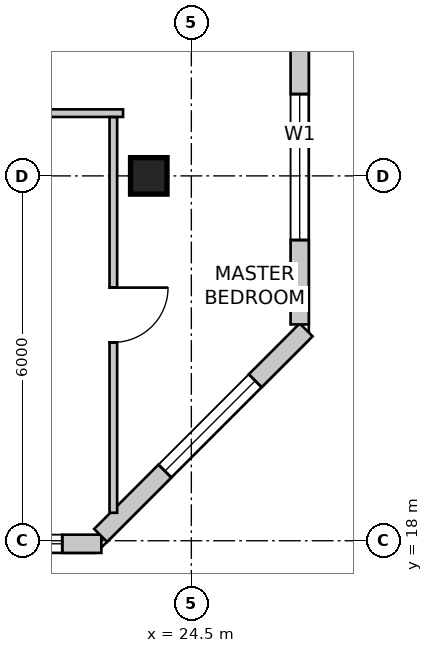
"""IFC4 building model, lengths in metres.
Left out: names, types, materials, properties, quantities, classifications, styles, units other than length and angle.
Written with IfcOpenShell. Run it as: python <this file> out.ifc"""

import sys

from ifc_helpers import new_model, si_unit, direction, frame, frame_2d, origin, origin_2d, place, context, subcontext, project, spatial, rectangle, extrude, source, transform, mapped, element, fill, save


model = new_model("IFC4")
c1 = context("Model", 3, precision=1e-05, world=origin(), true_north=direction((0.0, 1.0)))
c2 = subcontext(c1, "Body", "Model", "MODEL_VIEW")
j1 = project(units=[si_unit("LENGTHUNIT", "METRE"), si_unit("PLANEANGLEUNIT", "RADIAN")], contexts=[c1])
p1 = place(None, origin())
s1 = spatial("IfcSite", under=j1, at=p1, CompositionType="ELEMENT")
p2 = place(p1, origin())
s2 = spatial("IfcBuilding", under=s1, at=p2, CompositionType="ELEMENT")
p3 = place(p2, frame((0.0, 0.0, 252.9)))
s3 = spatial("IfcBuildingStorey", under=s2, at=p3, CompositionType="ELEMENT", Elevation=252.9)
m1 = source(origin(), c2, "Body", "SweptSolid", [
    extrude(rectangle(XDim=0.6, YDim=0.6, at=origin_2d()), origin(), (0.0, 0.0, 1.0), 3.6),
])
p4 = place(p3, frame((23.8, 24.0, 0.0), z_axis=(0.0, 0.0, 1.0), x_axis=(1.0, 0.0, 0.0)))
e1 = element("IfcColumn", 1, at=p4, inside=s3, PredefinedType="COLUMN", context=c2, shape_type="MappedRepresentation", body=[
    mapped(m1, transform((0.0, 0.0, 0.0), scale=1.0)),
])
p5 = place(p3, frame((12.678, 17.95, 0.0), z_axis=(0.0, 0.0, 1.0), x_axis=(1.0, 0.0, 0.0)))
e2 = element("IfcWall", 2, at=p5, inside=s3, PredefinedType="SOLIDWALL", context=c2, shape_type="SweptSolid", body=[
    extrude(rectangle(XDim=10.342, YDim=0.3, at=frame_2d((5.171, 0.0))), origin(), (0.0, 0.0, 1.0), 3.35),
])
m2 = source(origin(), c2, "Body", "SweptSolid", [
    extrude(rectangle(XDim=1.6, YDim=2.15, at=frame_2d((0.8, 1.075))), frame((0.0, 0.16, 0.0), z_axis=(0.0, -1.0, 0.0), x_axis=(1.0, 0.0, 0.0)), (0.0, 0.0, 1.0), 0.32),
])
p6 = place(p5, frame((4.204, 0.0, 0.0)))
e3 = element("IfcOpeningElement", 3, at=p6, cuts=e2, PredefinedType="OPENING", context=c2, shape_type="MappedRepresentation", body=[
    mapped(m2, transform((0.0, 0.0, 0.0), scale=1.0)),
])
m3 = source(origin(), c2, "Body", "SweptSolid", [
    extrude(rectangle(XDim=2.1, YDim=2.0, at=frame_2d((1.05, 1.0))), frame((0.0, 0.16, 0.0), z_axis=(0.0, -1.0, 0.0), x_axis=(1.0, 0.0, 0.0)), (0.0, 0.0, 1.0), 0.32),
])
p7 = place(p5, frame((0.547, 0.0, 0.85)))
e4 = element("IfcOpeningElement", 4, at=p7, cuts=e2, PredefinedType="OPENING", context=c2, shape_type="MappedRepresentation", body=[
    mapped(m3, transform((0.0, 0.0, 0.0), scale=1.0)),
])
m4 = source(origin(), c2, "Body", "SweptSolid", [
    extrude(rectangle(XDim=2.4, YDim=2.2, at=frame_2d((1.2, 1.1))), frame((0.0, 0.16, 0.0), z_axis=(0.0, -1.0, 0.0), x_axis=(1.0, 0.0, 0.0)), (0.0, 0.0, 1.0), 0.32),
])
p8 = place(p5, frame((7.299, 0.0, 0.85)))
e5 = element("IfcOpeningElement", 5, at=p8, cuts=e2, PredefinedType="OPENING", context=c2, shape_type="MappedRepresentation", body=[
    mapped(m4, transform((0.0, 0.0, 0.0), scale=1.0)),
])
p9 = place(p3, frame((23.008, 18.088, 0.0), z_axis=(0.0, 0.0, 1.0), x_axis=(0.707106781187, 0.707106781187, 0.0)))
e6 = element("IfcWall", 6, at=p9, inside=s3, PredefinedType="SOLIDWALL", context=c2, shape_type="SweptSolid", body=[
    extrude(rectangle(XDim=4.781, YDim=0.3, at=frame_2d((2.39, 0.0))), origin(), (0.0, 0.0, 1.0), 3.35),
])
p10 = place(p9, frame((1.496, 0.0, 0.85)))
e7 = element("IfcOpeningElement", 7, at=p10, cuts=e6, PredefinedType="OPENING", context=c2, shape_type="MappedRepresentation", body=[
    mapped(m3, transform((0.0, 0.0, 0.0), scale=1.0)),
])
p11 = place(p3, frame((26.282, 21.557, 0.0), z_axis=(0.0, 0.0, 1.0), x_axis=(0.0, 1.0, 0.0)))
e8 = element("IfcWall", 8, at=p11, inside=s3, PredefinedType="SOLIDWALL", context=c2, shape_type="SweptSolid", body=[
    extrude(rectangle(XDim=9.711, YDim=0.3, at=frame_2d((4.855, 0.0))), origin(), (0.0, 0.0, 1.0), 3.35),
])
p12 = place(p11, frame((1.388, 0.0, 0.85)))
e9 = element("IfcOpeningElement", 9, at=p12, cuts=e8, PredefinedType="OPENING", context=c2, shape_type="MappedRepresentation", body=[
    mapped(m4, transform((0.0, 0.0, 0.0), scale=1.0)),
])
p13 = place(p11, frame((6.073, 0.0, 0.85)))
e10 = element("IfcOpeningElement", 10, at=p13, cuts=e8, PredefinedType="OPENING", context=c2, shape_type="MappedRepresentation", body=[
    mapped(m3, transform((0.0, 0.0, 0.0), scale=1.0)),
])
p14 = place(p3, frame((23.377, 25.032, 0.0), z_axis=(0.0, 0.0, 1.0), x_axis=(-1.0, 0.0, 0.0)))
e11 = element("IfcWall", 11, at=p14, inside=s3, PredefinedType="PARTITIONING", context=c2, shape_type="SweptSolid", body=[
    extrude(rectangle(XDim=3.252, YDim=0.125, at=frame_2d((1.626, 0.0))), origin(), (0.0, 0.0, 1.0), 3.019),
])
p15 = place(p3, frame((23.217, 24.966, 0.0), z_axis=(0.0, 0.0, 1.0), x_axis=(0.0, -1.0, 0.0)))
e12 = element("IfcWall", 12, at=p15, inside=s3, PredefinedType="PARTITIONING", context=c2, shape_type="SweptSolid", body=[
    extrude(rectangle(XDim=6.506, YDim=0.125, at=frame_2d((3.253, 0.0))), origin(), (0.0, 0.0, 1.0), 2.979),
])
m5 = source(origin(), c2, "Body", "SweptSolid", [
    extrude(rectangle(XDim=0.9, YDim=2.15, at=frame_2d((0.45, 1.075))), frame((0.0, 0.073, 0.0), z_axis=(0.0, -1.0, 0.0), x_axis=(1.0, 0.0, 0.0)), (0.0, 0.0, 1.0), 0.145),
])
p16 = place(p15, frame((2.803, 0.0, 0.0)))
e13 = element("IfcOpeningElement", 13, at=p16, cuts=e12, PredefinedType="OPENING", context=c2, shape_type="MappedRepresentation", body=[
    mapped(m5, transform((0.0, 0.0, 0.0), scale=1.0)),
])
m6 = source(origin(), c2, "Body", "SweptSolid", [
    extrude(rectangle(XDim=2.4, YDim=2.2, at=frame_2d((1.2, 1.1))), frame((0.0, -0.015, 0.0), z_axis=(0.0, -1.0, 0.0), x_axis=(1.0, 0.0, 0.0)), (0.0, 0.0, 1.0), 0.06),
])
p17 = place(p8, origin())
e14 = element("IfcWindow", 14, at=p17, inside=s3, PartitioningType="SINGLE_PANEL", PredefinedType="WINDOW", context=c2, shape_type="MappedRepresentation", body=[
    mapped(m6, transform((0.0, 0.0, 0.0), scale=1.0)),
])
fill(e5, e14)
m7 = source(origin(), c2, "Body", "SweptSolid", [
    extrude(rectangle(XDim=2.1, YDim=2.0, at=frame_2d((1.05, 1.0))), frame((0.0, -0.015, 0.0), z_axis=(0.0, -1.0, 0.0), x_axis=(1.0, 0.0, 0.0)), (0.0, 0.0, 1.0), 0.06),
])
p18 = place(p10, origin())
e15 = element("IfcWindow", 15, at=p18, inside=s3, PartitioningType="SINGLE_PANEL", PredefinedType="WINDOW", context=c2, shape_type="MappedRepresentation", body=[
    mapped(m7, transform((0.0, 0.0, 0.0), scale=1.0)),
])
fill(e7, e15)
p19 = place(p12, origin())
e16 = element("IfcWindow", 16, at=p19, inside=s3, PartitioningType="SINGLE_PANEL", PredefinedType="WINDOW", context=c2, shape_type="MappedRepresentation", body=[
    mapped(m6, transform((0.0, 0.0, 0.0), scale=1.0)),
])
fill(e9, e16)
m8 = source(origin(), c2, "Body", "SweptSolid", [
    extrude(rectangle(XDim=0.9, YDim=2.15, at=frame_2d((0.45, 1.075))), frame((0.0, 0.025, 0.0), z_axis=(0.0, -1.0, 0.0), x_axis=(1.0, 0.0, 0.0)), (0.0, 0.0, 1.0), 0.05),
])
p20 = place(p16, origin())
e17 = element("IfcDoor", 17, at=p20, inside=s3, OperationType="SINGLE_SWING_LEFT", PredefinedType="DOOR", context=c2, shape_type="MappedRepresentation", body=[
    mapped(m8, transform((0.0, 0.0, 0.0), scale=1.0)),
])
fill(e13, e17)
save(model, sys.argv[1])
